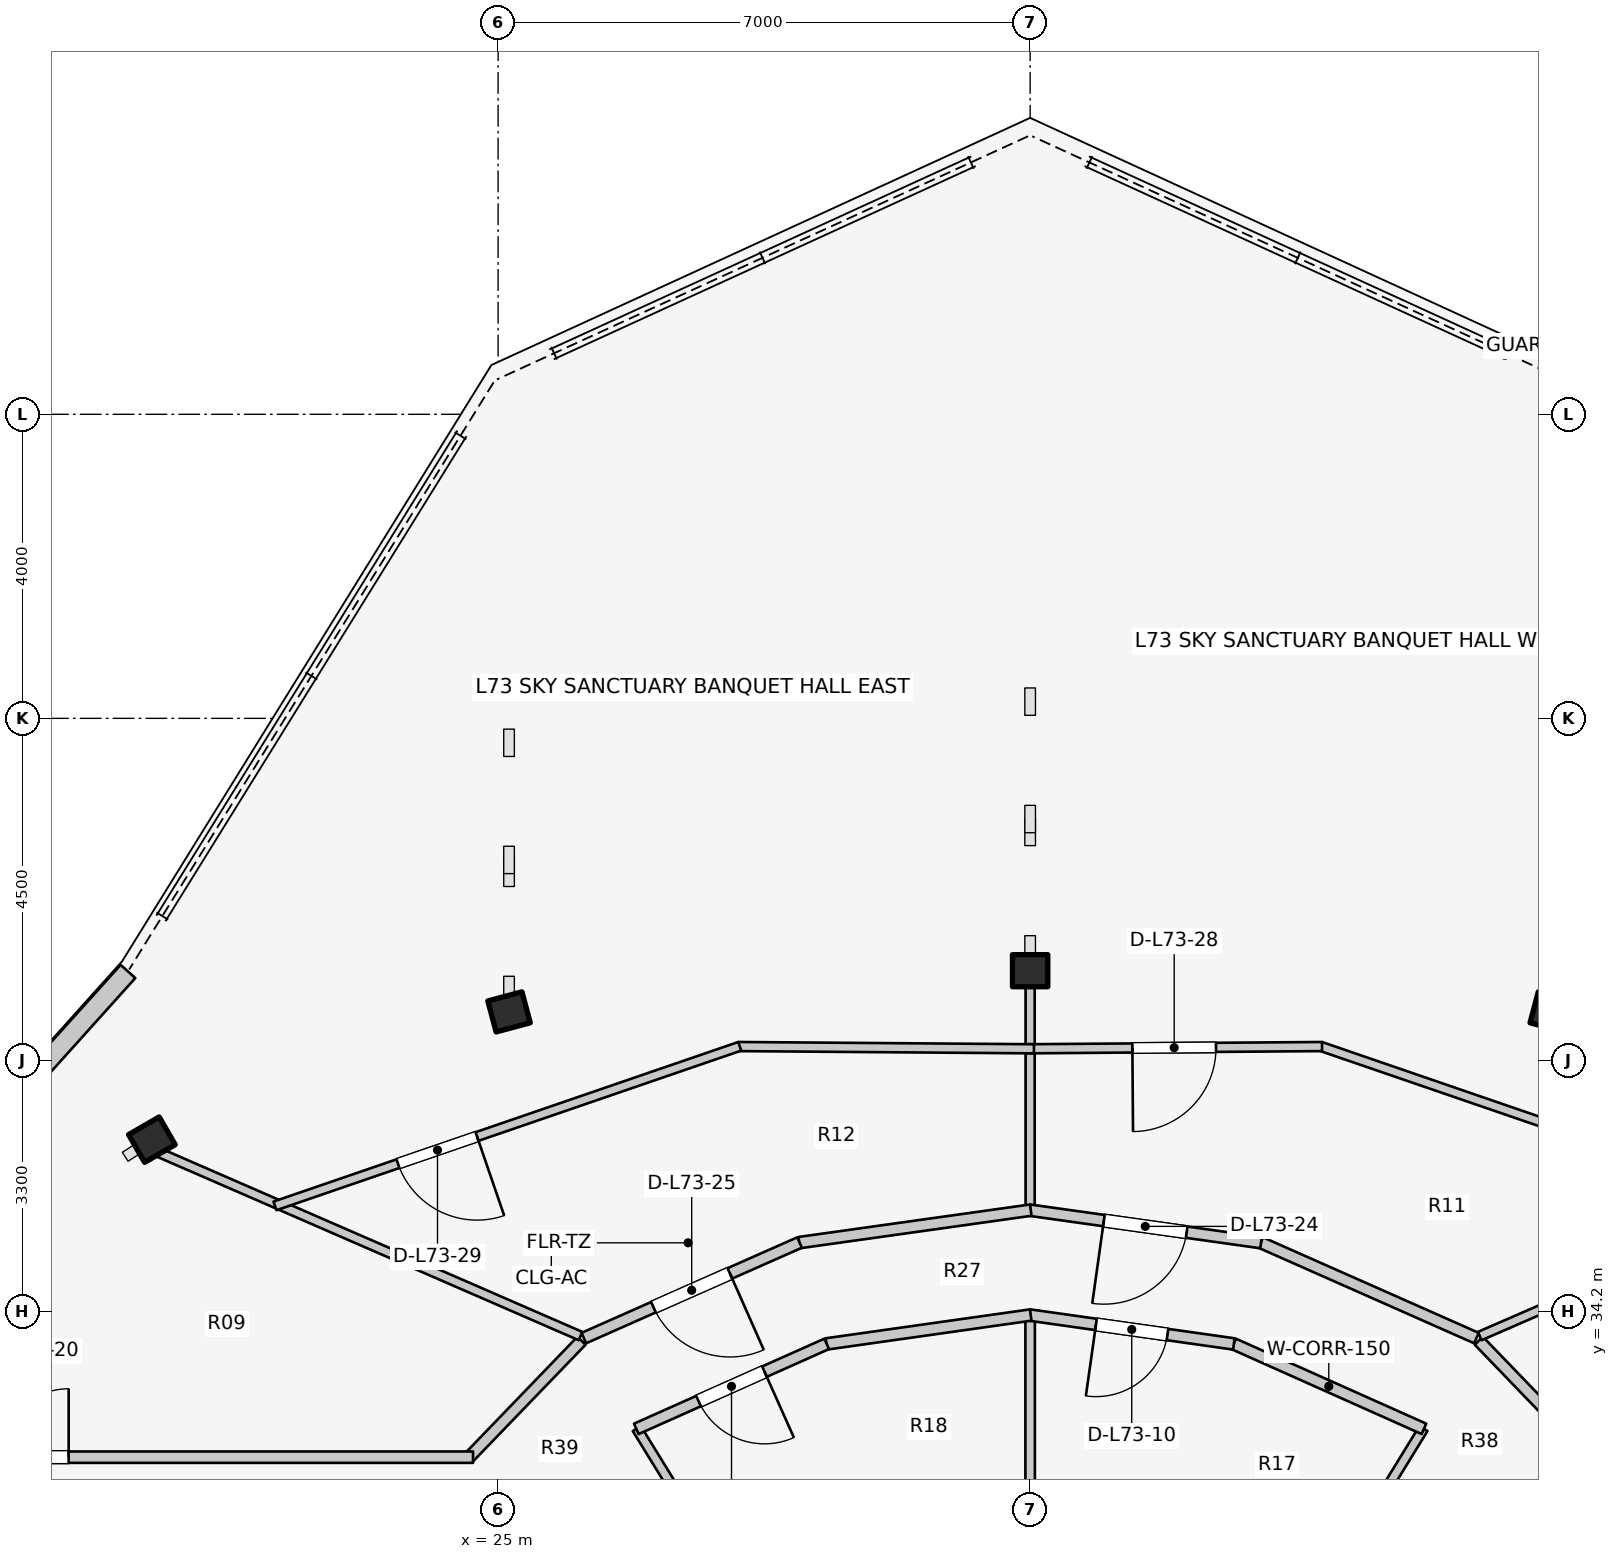
"""IFC4 building model, lengths in metres.
Left out: names, types, materials, properties, quantities, classifications, styles, units other than length and angle.
Written with IfcOpenShell. Run it as: python <this file> out.ifc"""

import sys

from ifc_helpers import new_model, si_unit, direction, frame, frame_2d, origin, origin_2d, place, context, subcontext, project, spatial, rectangle, i_section, extrude, element, fill, save


model = new_model("IFC4")
c1 = context("Model", 3, precision=1e-05, world=origin(), true_north=direction((0.0, 1.0)))
c2 = subcontext(c1, "Body", "Model", "MODEL_VIEW")
j1 = project(units=[si_unit("LENGTHUNIT", "METRE"), si_unit("PLANEANGLEUNIT", "RADIAN")], contexts=[c1])
p1 = place(None, origin())
s1 = spatial("IfcSite", under=j1, at=p1, CompositionType="ELEMENT")
p2 = place(p1, origin())
s2 = spatial("IfcBuilding", under=s1, at=p2, CompositionType="ELEMENT")
p3 = place(p2, frame((0.0, 0.0, 238.8)))
s3 = spatial("IfcBuildingStorey", under=s2, at=p3, CompositionType="ELEMENT", Elevation=238.8)
for number, where, z_axis, x_axis in (
    (1, (38.856, 38.138, 0.0), (0.0, 0.0, 1.0), (0.259, 0.966, 0.0)),
    (2, (32.0, 38.68, 0.0), (0.0, 0.0, 1.0), (0.0, 1.0, 0.0)),
    (3, (25.144, 38.138, 0.0), (0.0, 0.0, 1.0), (-0.259, 0.966, 0.0)),
    (4, (20.445, 36.457, 0.0), (0.0, 0.0, 1.0), (-0.5, 0.866, 0.0)),
):
    element("IfcColumn", number, at=place(p3, frame(where, z_axis=z_axis, x_axis=x_axis)), inside=s3, PredefinedType="COLUMN", context=c2, shape_type="SweptSolid", body=[
        extrude(i_section(OverallWidth=0.422, OverallDepth=0.465, WebThickness=0.045, FlangeThickness=0.073, FilletRadius=0.025, at=origin_2d()), origin(), (0.0, 0.0, 1.0), 3.6),
    ])
p4 = place(p3, frame((20.13, 38.67, 0.0), z_axis=(0.0, 0.0, 1.0), x_axis=(-0.668903560134, -0.743349196031, 0.0)))
e5 = element("IfcWall", 5, at=p4, inside=s3, PredefinedType="STANDARD", context=c2, shape_type="SweptSolid", body=[
    extrude(rectangle(XDim=5.513, YDim=0.26, at=frame_2d((2.756, 0.0))), origin(), (0.0, 0.0, 1.0), 3.29),
])
p5 = place(p3, frame((35.55, 30.015, 0.0), z_axis=(0.0, 0.0, 1.0), x_axis=(0.523992004803, 0.851723182086, 0.0)))
e6 = element("IfcWall", 6, at=p5, inside=s3, PredefinedType="PARTITIONING", context=c2, shape_type="SweptSolid", body=[
    extrude(rectangle(XDim=3.101, YDim=0.125, at=frame_2d((1.551, 0.0))), origin(), (0.0, 0.0, 1.0), 2.672),
])
p6 = place(p3, frame((32.0, 31.1, 0.0), z_axis=(0.0, 0.0, 1.0), x_axis=(0.0, 1.0, 0.0)))
e7 = element("IfcWall", 7, at=p6, inside=s3, PredefinedType="PARTITIONING", context=c2, shape_type="SweptSolid", body=[
    extrude(rectangle(XDim=3.05, YDim=0.125, at=frame_2d((1.525, 0.0))), origin(), (0.0, 0.0, 1.0), 2.672),
])
p7 = place(p3, frame((28.45, 30.015, 0.0), z_axis=(0.0, 0.0, 1.0), x_axis=(-0.523992004803, 0.851723182086, 0.0)))
e8 = element("IfcWall", 8, at=p7, inside=s3, PredefinedType="PARTITIONING", context=c2, shape_type="SweptSolid", body=[
    extrude(rectangle(XDim=3.101, YDim=0.125, at=frame_2d((1.551, 0.0))), origin(), (0.0, 0.0, 1.0), 2.672),
])
p8 = place(p3, frame((37.181, 32.652, 0.0), z_axis=(0.0, 0.0, 1.0), x_axis=(-0.913120130558, 0.407690602257, 0.0)))
e9 = element("IfcWall", 9, at=p8, inside=s3, PredefinedType="PARTITIONING", context=c2, shape_type="SweptSolid", body=[
    extrude(rectangle(XDim=2.743, YDim=0.15, at=frame_2d((1.371, 0.0))), origin(), (0.0, 0.0, 1.0), 2.823),
])
p9 = place(p3, frame((34.68, 33.77, 0.0), z_axis=(0.0, 0.0, 1.0), x_axis=(-0.990132151456, 0.140136799779, 0.0)))
e10 = element("IfcWall", 10, at=p9, inside=s3, PredefinedType="PARTITIONING", context=c2, shape_type="SweptSolid", body=[
    extrude(rectangle(XDim=2.714, YDim=0.15, at=frame_2d((1.357, 0.0))), origin(), (0.0, 0.0, 1.0), 2.823),
])
p10 = place(p9, frame((0.882, 0.0, 0.0)))
e11 = element("IfcOpeningElement", 11, at=p10, cuts=e10, PredefinedType="OPENING", context=c2, shape_type="SweptSolid", body=[
    extrude(rectangle(XDim=0.95, YDim=2.1, at=frame_2d((0.475, 1.05))), frame((0.0, 0.085, 0.0), z_axis=(0.0, -1.0, 0.0), x_axis=(1.0, 0.0, 0.0)), (0.0, 0.0, 1.0), 0.17),
])
p11 = place(p3, frame((32.007, 34.15, 0.0), z_axis=(0.0, 0.0, 1.0), x_axis=(-0.990132151456, -0.140136799779, 0.0)))
e12 = element("IfcWall", 12, at=p11, inside=s3, PredefinedType="PARTITIONING", context=c2, shape_type="SweptSolid", body=[
    extrude(rectangle(XDim=2.714, YDim=0.15, at=frame_2d((1.357, 0.0))), origin(), (0.0, 0.0, 1.0), 2.823),
])
p12 = place(p3, frame((29.323, 33.771, 0.0), z_axis=(0.0, 0.0, 1.0), x_axis=(-0.913120130558, -0.407690602257, 0.0)))
e13 = element("IfcWall", 13, at=p12, inside=s3, PredefinedType="PARTITIONING", context=c2, shape_type="SweptSolid", body=[
    extrude(rectangle(XDim=2.743, YDim=0.15, at=frame_2d((1.371, 0.0))), origin(), (0.0, 0.0, 1.0), 2.823),
])
p13 = place(p12, frame((0.896, 0.0, 0.0)))
e14 = element("IfcOpeningElement", 14, at=p13, cuts=e13, PredefinedType="OPENING", context=c2, shape_type="SweptSolid", body=[
    extrude(rectangle(XDim=0.95, YDim=2.1, at=frame_2d((0.475, 1.05))), frame((0.0, 0.085, 0.0), z_axis=(0.0, -1.0, 0.0), x_axis=(1.0, 0.0, 0.0)), (0.0, 0.0, 1.0), 0.17),
])
for number, where, z_axis, x_axis in (
    (15, (37.903, 33.812, 0.0), (0.0, 0.0, 1.0), (0.694, -0.72, 0.0)),
    (16, (26.097, 33.812, 0.0), (0.0, 0.0, 1.0), (-0.694, -0.72, 0.0)),
):
    element("IfcWall", number, at=place(p3, frame(where, z_axis=z_axis, x_axis=x_axis)), inside=s3, PredefinedType="PARTITIONING", context=c2, shape_type="SweptSolid", body=[
        extrude(rectangle(XDim=2.158, YDim=0.15, at=frame_2d((1.079, 0.0))), origin(), (0.0, 0.0, 1.0), 2.816),
    ])
p14 = place(p3, frame((17.15, 32.28, 0.0), z_axis=(0.0, 0.0, 1.0), x_axis=(1.0, 0.0, 0.0)))
e17 = element("IfcWall", 17, at=p14, inside=s3, PredefinedType="PARTITIONING", context=c2, shape_type="SweptSolid", body=[
    extrude(rectangle(XDim=7.52, YDim=0.15, at=frame_2d((3.76, 0.0))), origin(), (0.0, 0.0, 1.0), 2.816),
])
p15 = place(p14, frame((1.3, 0.0, 0.0)))
e18 = element("IfcOpeningElement", 18, at=p15, cuts=e17, PredefinedType="OPENING", context=c2, shape_type="SweptSolid", body=[
    extrude(rectangle(XDim=0.9, YDim=2.1, at=frame_2d((0.45, 1.05))), frame((0.0, 0.085, 0.0), z_axis=(0.0, -1.0, 0.0), x_axis=(1.0, 0.0, 0.0)), (0.0, 0.0, 1.0), 0.17),
])
p16 = place(p3, frame((37.915, 33.873, 0.0), z_axis=(0.0, 0.0, 1.0), x_axis=(0.916946661839, 0.399009798554, 0.0)))
e19 = element("IfcWall", 19, at=p16, inside=s3, PredefinedType="MOVABLE", context=c2, shape_type="SweptSolid", body=[
    extrude(rectangle(XDim=6.042, YDim=0.12, at=frame_2d((3.021, 0.0))), origin(), (0.0, 0.0, 1.0), 2.66),
])
p17 = place(p3, frame((32.0, 35.585, 0.0), z_axis=(0.0, 0.0, 1.0), x_axis=(0.0, 1.0, 0.0)))
e20 = element("IfcWall", 20, at=p17, inside=s3, PredefinedType="MOVABLE", context=c2, shape_type="SweptSolid", body=[
    extrude(rectangle(XDim=2.895, YDim=0.12, at=frame_2d((1.448, 0.0))), origin(), (0.0, 0.0, 1.0), 2.66),
])
p18 = place(p3, frame((26.085, 33.873, 0.0), z_axis=(0.0, 0.0, 1.0), x_axis=(-0.916946661839, 0.399009798554, 0.0)))
e21 = element("IfcWall", 21, at=p18, inside=s3, PredefinedType="MOVABLE", context=c2, shape_type="SweptSolid", body=[
    extrude(rectangle(XDim=6.042, YDim=0.12, at=frame_2d((3.021, 0.0))), origin(), (0.0, 0.0, 1.0), 2.66),
])
p19 = place(p3, frame((37.872, 33.847, 0.0), z_axis=(0.0, 0.0, 1.0), x_axis=(-0.914384748819, 0.404846305563, 0.0)))
e22 = element("IfcWall", 22, at=p19, inside=s3, PredefinedType="PARTITIONING", context=c2, shape_type="SweptSolid", body=[
    extrude(rectangle(XDim=3.104, YDim=0.15, at=frame_2d((1.552, 0.0))), origin(), (0.0, 0.0, 1.0), 2.823),
])
p20 = place(p3, frame((35.038, 35.103, 0.0), z_axis=(0.0, 0.0, 1.0), x_axis=(-0.990295701983, 0.138976338396, 0.0)))
e23 = element("IfcWall", 23, at=p20, inside=s3, PredefinedType="PARTITIONING", context=c2, shape_type="SweptSolid", body=[
    extrude(rectangle(XDim=3.076, YDim=0.15, at=frame_2d((1.538, 0.0))), origin(), (0.0, 0.0, 1.0), 2.823),
])
p21 = place(p20, frame((0.988, 0.0, 0.0)))
e24 = element("IfcOpeningElement", 24, at=p21, cuts=e23, PredefinedType="OPENING", context=c2, shape_type="SweptSolid", body=[
    extrude(rectangle(XDim=1.1, YDim=2.1, at=frame_2d((0.55, 1.05))), frame((0.0, 0.085, 0.0), z_axis=(0.0, -1.0, 0.0), x_axis=(1.0, 0.0, 0.0)), (0.0, 0.0, 1.0), 0.17),
])
p22 = place(p3, frame((32.008, 35.53, 0.0), z_axis=(0.0, 0.0, 1.0), x_axis=(-0.990295701983, -0.138976338396, 0.0)))
e25 = element("IfcWall", 25, at=p22, inside=s3, PredefinedType="PARTITIONING", context=c2, shape_type="SweptSolid", body=[
    extrude(rectangle(XDim=3.076, YDim=0.15, at=frame_2d((1.538, 0.0))), origin(), (0.0, 0.0, 1.0), 2.823),
])
p23 = place(p3, frame((28.966, 35.104, 0.0), z_axis=(0.0, 0.0, 1.0), x_axis=(-0.914384748819, -0.404846305563, 0.0)))
e26 = element("IfcWall", 26, at=p23, inside=s3, PredefinedType="PARTITIONING", context=c2, shape_type="SweptSolid", body=[
    extrude(rectangle(XDim=3.104, YDim=0.15, at=frame_2d((1.552, 0.0))), origin(), (0.0, 0.0, 1.0), 2.823),
])
p24 = place(p23, frame((1.002, 0.0, 0.0)))
e27 = element("IfcOpeningElement", 27, at=p24, cuts=e26, PredefinedType="OPENING", context=c2, shape_type="SweptSolid", body=[
    extrude(rectangle(XDim=1.1, YDim=2.1, at=frame_2d((0.55, 1.05))), frame((0.0, 0.085, 0.0), z_axis=(0.0, -1.0, 0.0), x_axis=(1.0, 0.0, 0.0)), (0.0, 0.0, 1.0), 0.17),
])
p25 = place(p3, frame((41.935, 35.586, 0.0), z_axis=(0.0, 0.0, 1.0), x_axis=(-0.945789589552, 0.324780005995, 0.0)))
e28 = element("IfcWall", 28, at=p25, inside=s3, PredefinedType="MOVABLE", context=c2, shape_type="SweptSolid", body=[
    extrude(rectangle(XDim=6.465, YDim=0.12, at=frame_2d((3.232, 0.0))), origin(), (0.0, 0.0, 1.0), 2.823),
])
p26 = place(p3, frame((35.841, 37.682, 0.0), z_axis=(0.0, 0.0, 1.0), x_axis=(-0.999971175398, -0.007592652624, 0.0)))
e29 = element("IfcWall", 29, at=p26, inside=s3, PredefinedType="MOVABLE", context=c2, shape_type="SweptSolid", body=[
    extrude(rectangle(XDim=3.891, YDim=0.12, at=frame_2d((1.945, 0.0))), origin(), (0.0, 0.0, 1.0), 2.823),
])
p27 = place(p26, frame((1.395, 0.0, 0.0)))
e30 = element("IfcOpeningElement", 30, at=p27, cuts=e29, PredefinedType="OPENING", context=c2, shape_type="SweptSolid", body=[
    extrude(rectangle(XDim=1.1, YDim=2.1, at=frame_2d((0.55, 1.05))), frame((0.0, 0.07, 0.0), z_axis=(0.0, -1.0, 0.0), x_axis=(1.0, 0.0, 0.0)), (0.0, 0.0, 1.0), 0.14),
])
p28 = place(p3, frame((32.05, 37.653, 0.0), z_axis=(0.0, 0.0, 1.0), x_axis=(-0.999971175398, 0.007592652624, 0.0)))
e31 = element("IfcWall", 31, at=p28, inside=s3, PredefinedType="MOVABLE", context=c2, shape_type="SweptSolid", body=[
    extrude(rectangle(XDim=3.891, YDim=0.12, at=frame_2d((1.945, 0.0))), origin(), (0.0, 0.0, 1.0), 2.823),
])
p29 = place(p3, frame((28.179, 37.685, 0.0), z_axis=(0.0, 0.0, 1.0), x_axis=(-0.945789589552, -0.324780005995, 0.0)))
e32 = element("IfcWall", 32, at=p29, inside=s3, PredefinedType="MOVABLE", context=c2, shape_type="SweptSolid", body=[
    extrude(rectangle(XDim=6.465, YDim=0.12, at=frame_2d((3.232, 0.0))), origin(), (0.0, 0.0, 1.0), 2.823),
])
p30 = place(p29, frame((3.654, 0.0, 0.0)))
e33 = element("IfcOpeningElement", 33, at=p30, cuts=e32, PredefinedType="OPENING", context=c2, shape_type="SweptSolid", body=[
    extrude(rectangle(XDim=1.1, YDim=2.1, at=frame_2d((0.55, 1.05))), frame((0.0, 0.07, 0.0), z_axis=(0.0, -1.0, 0.0), x_axis=(1.0, 0.0, 0.0)), (0.0, 0.0, 1.0), 0.14),
])
p31 = place(p10, origin())
e34 = element("IfcDoor", 34, at=p31, inside=s3, OperationType="SINGLE_SWING_RIGHT", PredefinedType="DOOR", context=c2, shape_type="SweptSolid", body=[
    extrude(rectangle(XDim=0.95, YDim=2.1, at=frame_2d((0.475, 1.05))), frame((0.0, 0.025, 0.0), z_axis=(0.0, -1.0, 0.0), x_axis=(1.0, 0.0, 0.0)), (0.0, 0.0, 1.0), 0.05),
])
fill(e11, e34)
p32 = place(p13, origin())
e35 = element("IfcDoor", 35, at=p32, inside=s3, OperationType="SINGLE_SWING_LEFT", PredefinedType="DOOR", context=c2, shape_type="SweptSolid", body=[
    extrude(rectangle(XDim=0.95, YDim=2.1, at=frame_2d((0.475, 1.05))), frame((0.0, 0.025, 0.0), z_axis=(0.0, -1.0, 0.0), x_axis=(1.0, 0.0, 0.0)), (0.0, 0.0, 1.0), 0.05),
])
fill(e14, e35)
p33 = place(p15, origin())
e36 = element("IfcDoor", 36, at=p33, inside=s3, OperationType="SINGLE_SWING_RIGHT", PredefinedType="DOOR", context=c2, shape_type="SweptSolid", body=[
    extrude(rectangle(XDim=0.9, YDim=2.1, at=frame_2d((0.45, 1.05))), frame((0.0, 0.025, 0.0), z_axis=(0.0, -1.0, 0.0), x_axis=(1.0, 0.0, 0.0)), (0.0, 0.0, 1.0), 0.05),
])
fill(e18, e36)
p34 = place(p21, origin())
e37 = element("IfcDoor", 37, at=p34, inside=s3, OperationType="SINGLE_SWING_RIGHT", PredefinedType="DOOR", context=c2, shape_type="SweptSolid", body=[
    extrude(rectangle(XDim=1.1, YDim=2.1, at=frame_2d((0.55, 1.05))), frame((0.0, 0.025, 0.0), z_axis=(0.0, -1.0, 0.0), x_axis=(1.0, 0.0, 0.0)), (0.0, 0.0, 1.0), 0.05),
])
fill(e24, e37)
p35 = place(p24, origin())
e38 = element("IfcDoor", 38, at=p35, inside=s3, OperationType="SINGLE_SWING_LEFT", PredefinedType="DOOR", context=c2, shape_type="SweptSolid", body=[
    extrude(rectangle(XDim=1.1, YDim=2.1, at=frame_2d((0.55, 1.05))), frame((0.0, 0.025, 0.0), z_axis=(0.0, -1.0, 0.0), x_axis=(1.0, 0.0, 0.0)), (0.0, 0.0, 1.0), 0.05),
])
fill(e27, e38)
p36 = place(p27, origin())
e39 = element("IfcDoor", 39, at=p36, inside=s3, OperationType="SINGLE_SWING_RIGHT", PredefinedType="DOOR", context=c2, shape_type="SweptSolid", body=[
    extrude(rectangle(XDim=1.1, YDim=2.1, at=frame_2d((0.55, 1.05))), frame((0.0, 0.025, 0.0), z_axis=(0.0, -1.0, 0.0), x_axis=(1.0, 0.0, 0.0)), (0.0, 0.0, 1.0), 0.05),
])
fill(e30, e39)
p37 = place(p30, origin())
e40 = element("IfcDoor", 40, at=p37, inside=s3, OperationType="SINGLE_SWING_LEFT", PredefinedType="DOOR", context=c2, shape_type="SweptSolid", body=[
    extrude(rectangle(XDim=1.1, YDim=2.1, at=frame_2d((0.55, 1.05))), frame((0.0, 0.025, 0.0), z_axis=(0.0, -1.0, 0.0), x_axis=(1.0, 0.0, 0.0)), (0.0, 0.0, 1.0), 0.05),
])
fill(e33, e40)
save(model, sys.argv[1])
